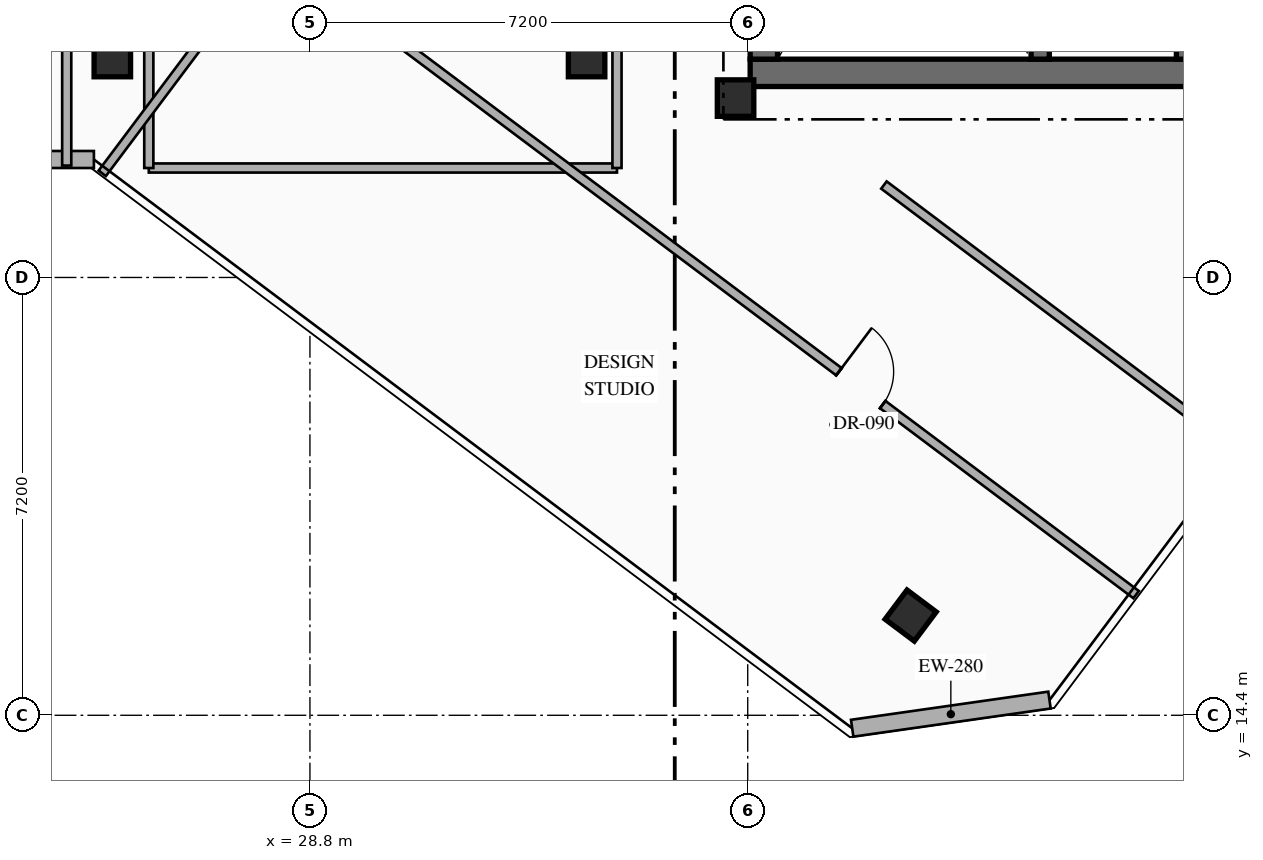
"""IFC4 building model, lengths in metres.
Left out: names, types, materials, properties, quantities, classifications, styles, units other than length and angle.
Written with IfcOpenShell. Run it as: python <this file> out.ifc"""

import sys

from ifc_helpers import new_model, si_unit, direction, frame, frame_2d, origin, origin_2d, place, context, subcontext, project, spatial, rectangle, hollow_rectangle, extrude, element, fill, save


model = new_model("IFC4")
c1 = context("Model", 3, precision=1e-05, world=origin(), true_north=direction((0.0, 1.0)))
c2 = subcontext(c1, "Body", "Model", "MODEL_VIEW")
j1 = project(units=[si_unit("LENGTHUNIT", "METRE"), si_unit("PLANEANGLEUNIT", "RADIAN")], contexts=[c1])
p1 = place(None, origin())
s1 = spatial("IfcSite", under=j1, at=p1, CompositionType="ELEMENT")
p2 = place(p1, origin())
s2 = spatial("IfcBuilding", under=s1, at=p2, CompositionType="ELEMENT")
p3 = place(p2, frame((0.0, 0.0, 269.95)))
s3 = spatial("IfcBuildingStorey", under=s2, at=p3, CompositionType="ELEMENT", Elevation=269.95)
p4 = place(p3, frame((36.04, 24.965, 0.0), z_axis=(0.0, 0.0, 1.0), x_axis=(1.0, 0.0, 0.0)))
e1 = element("IfcWall", 1, at=p4, inside=s3, PredefinedType="SHEAR", context=c2, shape_type="SweptSolid", body=[
    extrude(rectangle(XDim=7.46, YDim=0.45, at=frame_2d((3.73, 0.0))), origin(), (0.0, 0.0, 1.0), 4.0),
])
p5 = place(p3, frame((36.265, 25.19, 0.0), z_axis=(0.0, 0.0, 1.0), x_axis=(0.0, 1.0, 0.0)))
e2 = element("IfcWall", 2, at=p5, inside=s3, PredefinedType="SHEAR", context=c2, shape_type="SweptSolid", body=[
    extrude(rectangle(XDim=9.48, YDim=0.45, at=frame_2d((4.74, 0.0))), origin(), (0.0, 0.0, 1.0), 4.0),
])
p6 = place(p3, frame((43.275, 25.19, 0.0), z_axis=(0.0, 0.0, 1.0), x_axis=(0.0, 1.0, 0.0)))
e3 = element("IfcWall", 3, at=p6, inside=s3, PredefinedType="SHEAR", context=c2, shape_type="SweptSolid", body=[
    extrude(rectangle(XDim=9.48, YDim=0.45, at=frame_2d((4.74, 0.0))), origin(), (0.0, 0.0, 1.0), 4.0),
])
p7 = place(p6, frame((1.21, 0.0, 0.0)))
e4 = element("IfcOpeningElement", 4, at=p7, cuts=e3, PredefinedType="OPENING", context=c2, shape_type="SweptSolid", body=[
    extrude(rectangle(XDim=0.85, YDim=2.08, at=frame_2d((0.425, 1.04))), frame((0.0, 0.235, 0.0), z_axis=(0.0, -1.0, 0.0), x_axis=(1.0, 0.0, 0.0)), (0.0, 0.0, 1.0), 0.47),
])
p8 = place(p6, frame((4.46, 0.0, 0.0)))
e5 = element("IfcOpeningElement", 5, at=p8, cuts=e3, PredefinedType="OPENING", context=c2, shape_type="SweptSolid", body=[
    extrude(rectangle(XDim=0.85, YDim=2.08, at=frame_2d((0.425, 1.04))), frame((0.0, 0.235, 0.0), z_axis=(0.0, -1.0, 0.0), x_axis=(1.0, 0.0, 0.0)), (0.0, 0.0, 1.0), 0.47),
])
p9 = place(p3, frame((40.81, 25.19, 0.0), z_axis=(0.0, 0.0, 1.0), x_axis=(0.0, 1.0, 0.0)))
e6 = element("IfcWall", 6, at=p9, inside=s3, PredefinedType="SHEAR", context=c2, shape_type="SweptSolid", body=[
    extrude(rectangle(XDim=9.48, YDim=0.3, at=frame_2d((4.74, 0.0))), origin(), (0.0, 0.0, 1.0), 4.0),
])
for number, where, z_axis, x_axis in (
    (7, (35.8, 24.55, 0.0), (0.0, 0.0, 1.0), (1.0, 0.0, 0.0)),
    (8, (25.55, 25.2, 0.0), (0.0, 0.0, 1.0), (1.0, 0.0, 0.0)),
    (9, (33.35, 25.2, 0.0), (0.0, 0.0, 1.0), (1.0, 0.0, 0.0)),
    (10, (38.68, 16.04, 0.0), (0.0, 0.0, 1.0), (0.8, -0.6, 0.0)),
):
    element("IfcColumn", number, at=place(p3, frame(where, z_axis=z_axis, x_axis=x_axis)), inside=s3, PredefinedType="COLUMN", context=c2, shape_type="SweptSolid", body=[
        extrude(hollow_rectangle(XDim=0.6, YDim=0.6, WallThickness=0.025, at=origin_2d()), origin(), (0.0, 0.0, 1.0), 4.0),
    ])
p10 = place(p3, frame((40.963, 14.65, 0.0), z_axis=(0.0, 0.0, 1.0), x_axis=(-0.989977778067, -0.141223223777, 0.0)))
e11 = element("IfcWall", 11, at=p10, inside=s3, PredefinedType="STANDARD", context=c2, shape_type="SweptSolid", body=[
    extrude(rectangle(XDim=3.278, YDim=0.28, at=frame_2d((1.639, 0.0))), origin(), (0.0, 0.0, 1.0), 3.74),
])
p11 = place(p3, frame((25.247, 23.54, 0.0), z_axis=(0.0, 0.0, 1.0), x_axis=(-1.0, 0.0, 0.0)))
e12 = element("IfcWall", 12, at=p11, inside=s3, PredefinedType="STANDARD", context=c2, shape_type="SweptSolid", body=[
    extrude(rectangle(XDim=4.789, YDim=0.28, at=frame_2d((2.395, 0.0))), origin(), (0.0, 0.0, 1.0), 3.74),
])
p12 = place(p3, frame((26.15, 23.4, 0.0), z_axis=(0.0, 0.0, 1.0), x_axis=(1.0, 0.0, 0.0)))
e13 = element("IfcWall", 13, at=p12, inside=s3, PredefinedType="PARTITIONING", context=c2, shape_type="SweptSolid", body=[
    extrude(rectangle(XDim=7.7, YDim=0.15, at=frame_2d((3.85, 0.0))), origin(), (0.0, 0.0, 1.0), 3.74),
])
for number, where, z_axis, x_axis in (
    (14, (26.15, 23.4, 0.0), (0.0, 0.0, 1.0), (0.0, 1.0, 0.0)),
    (15, (33.85, 23.4, 0.0), (0.0, 0.0, 1.0), (0.0, 1.0, 0.0)),
):
    element("IfcWall", number, at=place(p3, frame(where, z_axis=z_axis, x_axis=x_axis)), inside=s3, PredefinedType="PARTITIONING", context=c2, shape_type="SweptSolid", body=[
        extrude(rectangle(XDim=6.65, YDim=0.15, at=frame_2d((3.325, 0.0))), origin(), (0.0, 0.0, 1.0), 3.74),
    ])
p13 = place(p3, frame((28.18, 27.04, 0.0), z_axis=(0.0, 0.0, 1.0), x_axis=(0.8, -0.6, 0.0)))
e16 = element("IfcWall", 16, at=p13, inside=s3, PredefinedType="PARTITIONING", context=c2, shape_type="SweptSolid", body=[
    extrude(rectangle(XDim=17.76, YDim=0.15, at=frame_2d((8.88, 0.0))), origin(), (0.0, 0.0, 1.0), 3.74),
])
p14 = place(p13, frame((11.65, 0.0, 0.0)))
e17 = element("IfcOpeningElement", 17, at=p14, cuts=e16, PredefinedType="OPENING", context=c2, shape_type="SweptSolid", body=[
    extrude(rectangle(XDim=0.9, YDim=2.15, at=frame_2d((0.45, 1.075))), frame((0.0, 0.085, 0.0), z_axis=(0.0, -1.0, 0.0), x_axis=(1.0, 0.0, 0.0)), (0.0, 0.0, 1.0), 0.17),
])
p15 = place(p3, frame((25.384, 23.312, 0.0), z_axis=(0.0, 0.0, 1.0), x_axis=(0.599983234706, 0.800012573696, 0.0)))
e18 = element("IfcWall", 18, at=p15, inside=s3, PredefinedType="PARTITIONING", context=c2, shape_type="SweptSolid", body=[
    extrude(rectangle(XDim=4.66, YDim=0.15, at=frame_2d((2.33, 0.0))), origin(), (0.0, 0.0, 1.0), 3.74),
])
p16 = place(p3, frame((24.8, 23.44, 0.0), z_axis=(0.0, 0.0, 1.0), x_axis=(0.0, 1.0, 0.0)))
e19 = element("IfcWall", 19, at=p16, inside=s3, PredefinedType="PARTITIONING", context=c2, shape_type="SweptSolid", body=[
    extrude(rectangle(XDim=6.96, YDim=0.15, at=frame_2d((3.48, 0.0))), origin(), (0.0, 0.0, 1.0), 3.74),
])
p17 = place(p3, frame((38.24, 23.12, 0.0), z_axis=(0.0, 0.0, 1.0), x_axis=(0.799996019408, -0.60000530742, 0.0)))
e20 = element("IfcWall", 20, at=p17, inside=s3, PredefinedType="PARTITIONING", context=c2, shape_type="SweptSolid", body=[
    extrude(rectangle(XDim=7.36, YDim=0.15, at=frame_2d((3.68, 0.0))), origin(), (0.0, 0.0, 1.0), 3.74),
])
p18 = place(p14, origin())
e21 = element("IfcDoor", 21, at=p18, inside=s3, OperationType="SINGLE_SWING_LEFT", PredefinedType="DOOR", context=c2, shape_type="SweptSolid", body=[
    extrude(rectangle(XDim=0.9, YDim=2.15, at=frame_2d((0.45, 1.075))), frame((0.0, 0.025, 0.0), z_axis=(0.0, -1.0, 0.0), x_axis=(1.0, 0.0, 0.0)), (0.0, 0.0, 1.0), 0.05),
])
fill(e17, e21)
save(model, sys.argv[1])
